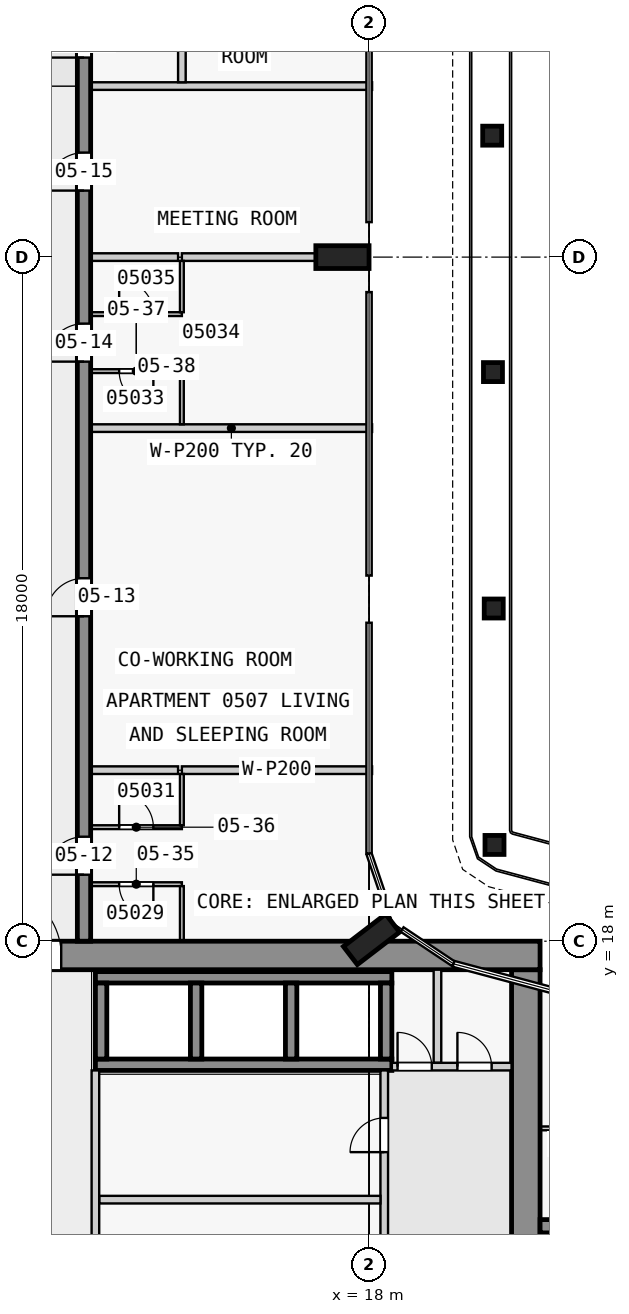
"""IFC4 building model, lengths in metres.
Left out: names, types, materials, properties, quantities, classifications, styles, units other than length and angle.
Written with IfcOpenShell. Run it as: python <this file> out.ifc"""

import sys

from ifc_helpers import new_model, si_unit, direction, frame, frame_2d, origin, origin_2d, place, context, subcontext, project, spatial, rectangle, hollow_rectangle, extrude, element, fill, save


model = new_model("IFC4")
c1 = context("Model", 3, precision=1e-05, world=origin(), true_north=direction((0.0, 1.0)))
c2 = subcontext(c1, "Body", "Model", "MODEL_VIEW")
j1 = project(units=[si_unit("LENGTHUNIT", "METRE"), si_unit("PLANEANGLEUNIT", "RADIAN")], contexts=[c1])
p1 = place(None, origin())
s1 = spatial("IfcSite", under=j1, at=p1, CompositionType="ELEMENT")
p2 = place(p1, origin())
s2 = spatial("IfcBuilding", under=s1, at=p2, CompositionType="ELEMENT")
p3 = place(p2, frame((0.0, 0.0, 26.8)))
s3 = spatial("IfcBuildingStorey", under=s2, at=p3, CompositionType="ELEMENT", Elevation=26.8)
for number, where, z_axis, x_axis in (
    (1, (18.065, 18.05, 0.0), (0.0, 0.0, 1.0), (-0.609, 0.793, 0.0)),
    (2, (17.3, 36.0, 0.0), (0.0, 0.0, 1.0), (0.0, 1.0, 0.0)),
):
    element("IfcColumn", number, at=place(p3, frame(where, z_axis=z_axis, x_axis=x_axis)), inside=s3, PredefinedType="COLUMN", context=c2, shape_type="SweptSolid", body=[
        extrude(rectangle(XDim=0.6, YDim=1.4, at=origin_2d()), origin(), (0.0, 0.0, 1.0), 3.5),
    ])
p4 = place(p3, frame((1.55, 17.625, 0.0), z_axis=(0.0, 0.0, 1.0), x_axis=(1.0, 0.0, 0.0)))
e3 = element("IfcWall", 3, at=p4, inside=s3, PredefinedType="SHEAR", context=c2, shape_type="SweptSolid", body=[
    extrude(rectangle(XDim=20.95, YDim=0.75, at=frame_2d((10.475, 0.0))), origin(), (0.0, 0.0, 1.0), 3.25),
])
p5 = place(p4, frame((6.55, 0.0, 0.0)))
e4 = element("IfcOpeningElement", 4, at=p5, cuts=e3, PredefinedType="OPENING", context=c2, shape_type="SweptSolid", body=[
    extrude(rectangle(XDim=1.8, YDim=2.1, at=frame_2d((0.9, 1.05))), frame((0.0, 0.385, 0.0), z_axis=(0.0, -1.0, 0.0), x_axis=(1.0, 0.0, 0.0)), (0.0, 0.0, 1.0), 0.77),
])
p6 = place(p3, frame((22.125, 2.5, 0.0), z_axis=(0.0, 0.0, 1.0), x_axis=(0.0, 1.0, 0.0)))
e5 = element("IfcWall", 5, at=p6, inside=s3, PredefinedType="SHEAR", context=c2, shape_type="SweptSolid", body=[
    extrude(rectangle(XDim=14.75, YDim=0.75, at=frame_2d((7.375, 0.0))), origin(), (0.0, 0.0, 1.0), 3.25),
])
p7 = place(p6, frame((5.6, 0.0, 0.0)))
e6 = element("IfcOpeningElement", 6, at=p7, cuts=e5, PredefinedType="OPENING", context=c2, shape_type="SweptSolid", body=[
    extrude(rectangle(XDim=1.8, YDim=2.1, at=frame_2d((0.9, 1.05))), frame((0.0, 0.385, 0.0), z_axis=(0.0, -1.0, 0.0), x_axis=(1.0, 0.0, 0.0)), (0.0, 0.0, 1.0), 0.77),
])
for number, where, z_axis, x_axis in (
    (7, (10.8, 17.05, 0.0), (0.0, 0.0, 1.0), (1.0, 0.0, 0.0)),
    (8, (10.8, 14.75, 0.0), (0.0, 0.0, 1.0), (1.0, 0.0, 0.0)),
):
    element("IfcWall", number, at=place(p3, frame(where, z_axis=z_axis, x_axis=x_axis)), inside=s3, PredefinedType="SHEAR", context=c2, shape_type="SweptSolid", body=[
        extrude(rectangle(XDim=7.8, YDim=0.3, at=frame_2d((3.9, 0.0))), origin(), (0.0, 0.0, 1.0), 3.25),
    ])
for number, where, z_axis, x_axis in (
    (9, (10.95, 14.9, 0.0), (0.0, 0.0, 1.0), (0.0, 1.0, 0.0)),
    (10, (13.45, 14.9, 0.0), (0.0, 0.0, 1.0), (0.0, 1.0, 0.0)),
    (11, (15.95, 14.9, 0.0), (0.0, 0.0, 1.0), (0.0, 1.0, 0.0)),
    (12, (18.45, 14.9, 0.0), (0.0, 0.0, 1.0), (0.0, 1.0, 0.0)),
):
    element("IfcWall", number, at=place(p3, frame(where, z_axis=z_axis, x_axis=x_axis)), inside=s3, PredefinedType="SHEAR", context=c2, shape_type="SweptSolid", body=[
        extrude(rectangle(XDim=2.0, YDim=0.3, at=frame_2d((1.0, 0.0))), origin(), (0.0, 0.0, 1.0), 3.25),
    ])
p8 = place(p3, frame((22.5, 10.5, 0.0), z_axis=(0.0, 0.0, 1.0), x_axis=(1.0, 0.0, 0.0)))
e13 = element("IfcWall", 13, at=p8, inside=s3, PredefinedType="SHEAR", context=c2, shape_type="SweptSolid", body=[
    extrude(rectangle(XDim=22.5, YDim=0.35, at=frame_2d((11.25, 0.0))), origin(), (0.0, 0.0, 1.0), 3.25),
])
p9 = place(p8, frame((6.05, 0.0, 0.0)))
e14 = element("IfcOpeningElement", 14, at=p9, cuts=e13, PredefinedType="OPENING", context=c2, shape_type="SweptSolid", body=[
    extrude(rectangle(XDim=1.0, YDim=2.1, at=frame_2d((0.5, 1.05))), frame((0.0, 0.185, 0.0), z_axis=(0.0, -1.0, 0.0), x_axis=(1.0, 0.0, 0.0)), (0.0, 0.0, 1.0), 0.37),
])
p10 = place(p8, frame((15.25, 0.0, 0.0)))
e15 = element("IfcOpeningElement", 15, at=p10, cuts=e13, PredefinedType="OPENING", context=c2, shape_type="SweptSolid", body=[
    extrude(rectangle(XDim=1.0, YDim=2.1, at=frame_2d((0.5, 1.05))), frame((0.0, 0.185, 0.0), z_axis=(0.0, -1.0, 0.0), x_axis=(1.0, 0.0, 0.0)), (0.0, 0.0, 1.0), 0.37),
])
p11 = place(p8, frame((19.75, 0.0, 0.0)))
e16 = element("IfcOpeningElement", 16, at=p11, cuts=e13, PredefinedType="OPENING", context=c2, shape_type="SweptSolid", body=[
    extrude(rectangle(XDim=1.0, YDim=2.1, at=frame_2d((0.5, 1.05))), frame((0.0, 0.185, 0.0), z_axis=(0.0, -1.0, 0.0), x_axis=(1.0, 0.0, 0.0)), (0.0, 0.0, 1.0), 0.37),
])
p12 = place(p3, frame((10.5, 18.0, 0.0), z_axis=(0.0, 0.0, 1.0), x_axis=(0.0, 1.0, 0.0)))
e17 = element("IfcWall", 17, at=p12, inside=s3, PredefinedType="SHEAR", context=c2, shape_type="SweptSolid", body=[
    extrude(rectangle(XDim=27.0, YDim=0.35, at=frame_2d((13.5, 0.0))), origin(), (0.0, 0.0, 1.0), 3.25),
])
p13 = place(p12, frame((1.75, 0.0, 0.0)))
e18 = element("IfcOpeningElement", 18, at=p13, cuts=e17, PredefinedType="OPENING", context=c2, shape_type="SweptSolid", body=[
    extrude(rectangle(XDim=1.0, YDim=2.1, at=frame_2d((0.5, 1.05))), frame((0.0, 0.185, 0.0), z_axis=(0.0, -1.0, 0.0), x_axis=(1.0, 0.0, 0.0)), (0.0, 0.0, 1.0), 0.37),
])
p14 = place(p12, frame((8.55, 0.0, 0.0)))
e19 = element("IfcOpeningElement", 19, at=p14, cuts=e17, PredefinedType="OPENING", context=c2, shape_type="SweptSolid", body=[
    extrude(rectangle(XDim=1.0, YDim=2.1, at=frame_2d((0.5, 1.05))), frame((0.0, 0.185, 0.0), z_axis=(0.0, -1.0, 0.0), x_axis=(1.0, 0.0, 0.0)), (0.0, 0.0, 1.0), 0.37),
])
p15 = place(p12, frame((15.25, 0.0, 0.0)))
e20 = element("IfcOpeningElement", 20, at=p15, cuts=e17, PredefinedType="OPENING", context=c2, shape_type="SweptSolid", body=[
    extrude(rectangle(XDim=1.0, YDim=2.1, at=frame_2d((0.5, 1.05))), frame((0.0, 0.185, 0.0), z_axis=(0.0, -1.0, 0.0), x_axis=(1.0, 0.0, 0.0)), (0.0, 0.0, 1.0), 0.37),
])
p16 = place(p12, frame((19.75, 0.0, 0.0)))
e21 = element("IfcOpeningElement", 21, at=p16, cuts=e17, PredefinedType="OPENING", context=c2, shape_type="SweptSolid", body=[
    extrude(rectangle(XDim=1.0, YDim=2.1, at=frame_2d((0.5, 1.05))), frame((0.0, 0.185, 0.0), z_axis=(0.0, -1.0, 0.0), x_axis=(1.0, 0.0, 0.0)), (0.0, 0.0, 1.0), 0.37),
])
p17 = place(p12, frame((23.25, 0.0, 0.0)))
e22 = element("IfcOpeningElement", 22, at=p17, cuts=e17, PredefinedType="OPENING", context=c2, shape_type="SweptSolid", body=[
    extrude(rectangle(XDim=0.9, YDim=2.1, at=frame_2d((0.45, 1.05))), frame((0.0, 0.185, 0.0), z_axis=(0.0, -1.0, 0.0), x_axis=(1.0, 0.0, 0.0)), (0.0, 0.0, 1.0), 0.37),
])
p18 = place(p12, frame((25.45, 0.0, 0.0)))
e23 = element("IfcOpeningElement", 23, at=p18, cuts=e17, PredefinedType="OPENING", context=c2, shape_type="SweptSolid", body=[
    extrude(rectangle(XDim=1.0, YDim=2.1, at=frame_2d((0.5, 1.05))), frame((0.0, 0.185, 0.0), z_axis=(0.0, -1.0, 0.0), x_axis=(1.0, 0.0, 0.0)), (0.0, 0.0, 1.0), 0.37),
])
p19 = place(p3, frame((10.8, 8.4, 0.0), z_axis=(0.0, 0.0, 1.0), x_axis=(0.0, 1.0, 0.0)))
e24 = element("IfcWall", 24, at=p19, inside=s3, PredefinedType="PARTITIONING", context=c2, shape_type="SweptSolid", body=[
    extrude(rectangle(XDim=6.2, YDim=0.2, at=frame_2d((3.1, 0.0))), origin(), (0.0, 0.0, 1.0), 3.25),
])
p20 = place(p3, frame((18.4, 8.4, 0.0), z_axis=(0.0, 0.0, 1.0), x_axis=(0.0, 1.0, 0.0)))
e25 = element("IfcWall", 25, at=p20, inside=s3, PredefinedType="PARTITIONING", context=c2, shape_type="SweptSolid", body=[
    extrude(rectangle(XDim=6.2, YDim=0.2, at=frame_2d((3.1, 0.0))), origin(), (0.0, 0.0, 1.0), 3.25),
])
p21 = place(p20, frame((0.95, 0.0, 0.0)))
e26 = element("IfcOpeningElement", 26, at=p21, cuts=e25, PredefinedType="OPENING", context=c2, shape_type="SweptSolid", body=[
    extrude(rectangle(XDim=0.9, YDim=2.1, at=frame_2d((0.45, 1.05))), frame((0.0, 0.11, 0.0), z_axis=(0.0, -1.0, 0.0), x_axis=(1.0, 0.0, 0.0)), (0.0, 0.0, 1.0), 0.22),
])
p22 = place(p20, frame((4.05, 0.0, 0.0)))
e27 = element("IfcOpeningElement", 27, at=p22, cuts=e25, PredefinedType="OPENING", context=c2, shape_type="SweptSolid", body=[
    extrude(rectangle(XDim=0.9, YDim=2.1, at=frame_2d((0.45, 1.05))), frame((0.0, 0.11, 0.0), z_axis=(0.0, -1.0, 0.0), x_axis=(1.0, 0.0, 0.0)), (0.0, 0.0, 1.0), 0.22),
])
p23 = place(p3, frame((10.9, 11.2, 0.0), z_axis=(0.0, 0.0, 1.0), x_axis=(1.0, 0.0, 0.0)))
e28 = element("IfcWall", 28, at=p23, inside=s3, PredefinedType="PARTITIONING", context=c2, shape_type="SweptSolid", body=[
    extrude(rectangle(XDim=7.4, YDim=0.2, at=frame_2d((3.7, 0.0))), origin(), (0.0, 0.0, 1.0), 3.25),
])
p24 = place(p3, frame((18.6, 14.7, 0.0), z_axis=(0.0, 0.0, 1.0), x_axis=(1.0, 0.0, 0.0)))
e29 = element("IfcWall", 29, at=p24, inside=s3, PredefinedType="PARTITIONING", context=c2, shape_type="SweptSolid", body=[
    extrude(rectangle(XDim=3.15, YDim=0.2, at=frame_2d((1.575, 0.0))), origin(), (0.0, 0.0, 1.0), 3.25),
])
p25 = place(p24, frame((0.15, 0.0, 0.0)))
e30 = element("IfcOpeningElement", 30, at=p25, cuts=e29, PredefinedType="OPENING", context=c2, shape_type="SweptSolid", body=[
    extrude(rectangle(XDim=0.9, YDim=2.1, at=frame_2d((0.45, 1.05))), frame((0.0, 0.11, 0.0), z_axis=(0.0, -1.0, 0.0), x_axis=(1.0, 0.0, 0.0)), (0.0, 0.0, 1.0), 0.22),
])
p26 = place(p24, frame((1.725, 0.0, 0.0)))
e31 = element("IfcOpeningElement", 31, at=p26, cuts=e29, PredefinedType="OPENING", context=c2, shape_type="SweptSolid", body=[
    extrude(rectangle(XDim=0.9, YDim=2.1, at=frame_2d((0.45, 1.05))), frame((0.0, 0.11, 0.0), z_axis=(0.0, -1.0, 0.0), x_axis=(1.0, 0.0, 0.0)), (0.0, 0.0, 1.0), 0.22),
])
p27 = place(p3, frame((19.8, 14.8, 0.0), z_axis=(0.0, 0.0, 1.0), x_axis=(0.0, 1.0, 0.0)))
e32 = element("IfcWall", 32, at=p27, inside=s3, PredefinedType="PARTITIONING", context=c2, shape_type="SweptSolid", body=[
    extrude(rectangle(XDim=2.45, YDim=0.2, at=frame_2d((1.225, 0.0))), origin(), (0.0, 0.0, 1.0), 3.25),
])
p28 = place(p3, frame((24.25, 13.075, 0.0), z_axis=(0.0, 0.0, 1.0), x_axis=(-1.0, 0.0, 0.0)))
e33 = element("IfcWall", 33, at=p28, inside=s3, PredefinedType="PARTITIONING", context=c2, shape_type="SweptSolid", body=[
    extrude(rectangle(XDim=1.75, YDim=0.1, at=frame_2d((0.875, 0.0))), origin(), (0.0, 0.0, 1.0), 3.25),
])
p29 = place(p3, frame((13.075, 19.5, 0.0), z_axis=(0.0, 0.0, 1.0), x_axis=(-1.0, 0.0, 0.0)))
e34 = element("IfcWall", 34, at=p29, inside=s3, PredefinedType="PARTITIONING", context=c2, shape_type="SweptSolid", body=[
    extrude(rectangle(XDim=2.4, YDim=0.1, at=frame_2d((1.2, 0.0))), origin(), (0.0, 0.0, 1.0), 3.25),
])
p30 = place(p29, frame((0.75, 0.0, 0.0)))
e35 = element("IfcOpeningElement", 35, at=p30, cuts=e34, PredefinedType="OPENING", context=c2, shape_type="SweptSolid", body=[
    extrude(rectangle(XDim=0.9, YDim=2.1, at=frame_2d((0.45, 1.05))), frame((0.0, 0.06, 0.0), z_axis=(0.0, -1.0, 0.0), x_axis=(1.0, 0.0, 0.0)), (0.0, 0.0, 1.0), 0.12),
])
p31 = place(p3, frame((10.675, 21.0, 0.0), z_axis=(0.0, 0.0, 1.0), x_axis=(1.0, 0.0, 0.0)))
e36 = element("IfcWall", 36, at=p31, inside=s3, PredefinedType="PARTITIONING", context=c2, shape_type="SweptSolid", body=[
    extrude(rectangle(XDim=2.4, YDim=0.1, at=frame_2d((1.2, 0.0))), origin(), (0.0, 0.0, 1.0), 3.25),
])
p32 = place(p31, frame((0.75, 0.0, 0.0)))
e37 = element("IfcOpeningElement", 37, at=p32, cuts=e36, PredefinedType="OPENING", context=c2, shape_type="SweptSolid", body=[
    extrude(rectangle(XDim=0.9, YDim=2.1, at=frame_2d((0.45, 1.05))), frame((0.0, 0.06, 0.0), z_axis=(0.0, -1.0, 0.0), x_axis=(1.0, 0.0, 0.0)), (0.0, 0.0, 1.0), 0.12),
])
p33 = place(p3, frame((12.975, 22.5, 0.0), z_axis=(0.0, 0.0, 1.0), x_axis=(-1.0, 0.0, 0.0)))
e38 = element("IfcWall", 38, at=p33, inside=s3, PredefinedType="PARTITIONING", context=c2, shape_type="SweptSolid", body=[
    extrude(rectangle(XDim=2.3, YDim=0.2, at=frame_2d((1.15, 0.0))), origin(), (0.0, 0.0, 1.0), 3.25),
])
p34 = place(p3, frame((13.075, 22.5, 0.0), z_axis=(0.0, 0.0, 1.0), x_axis=(1.0, 0.0, 0.0)))
e39 = element("IfcWall", 39, at=p34, inside=s3, PredefinedType="PARTITIONING", context=c2, shape_type="SweptSolid", body=[
    extrude(rectangle(XDim=5.005, YDim=0.2, at=frame_2d((2.502, 0.0))), origin(), (0.0, 0.0, 1.0), 3.25),
])
p35 = place(p3, frame((18.08, 31.5, 0.0), z_axis=(0.0, 0.0, 1.0), x_axis=(-1.0, 0.0, 0.0)))
e40 = element("IfcWall", 40, at=p35, inside=s3, PredefinedType="PARTITIONING", context=c2, shape_type="SweptSolid", body=[
    extrude(rectangle(XDim=7.405, YDim=0.2, at=frame_2d((3.703, 0.0))), origin(), (0.0, 0.0, 1.0), 3.25),
])
p36 = place(p3, frame((13.075, 33.0, 0.0), z_axis=(0.0, 0.0, 1.0), x_axis=(-1.0, 0.0, 0.0)))
e41 = element("IfcWall", 41, at=p36, inside=s3, PredefinedType="PARTITIONING", context=c2, shape_type="SweptSolid", body=[
    extrude(rectangle(XDim=2.4, YDim=0.1, at=frame_2d((1.2, 0.0))), origin(), (0.0, 0.0, 1.0), 3.25),
])
p37 = place(p36, frame((0.75, 0.0, 0.0)))
e42 = element("IfcOpeningElement", 42, at=p37, cuts=e41, PredefinedType="OPENING", context=c2, shape_type="SweptSolid", body=[
    extrude(rectangle(XDim=0.9, YDim=2.1, at=frame_2d((0.45, 1.05))), frame((0.0, 0.06, 0.0), z_axis=(0.0, -1.0, 0.0), x_axis=(1.0, 0.0, 0.0)), (0.0, 0.0, 1.0), 0.12),
])
p38 = place(p3, frame((10.675, 34.5, 0.0), z_axis=(0.0, 0.0, 1.0), x_axis=(1.0, 0.0, 0.0)))
e43 = element("IfcWall", 43, at=p38, inside=s3, PredefinedType="PARTITIONING", context=c2, shape_type="SweptSolid", body=[
    extrude(rectangle(XDim=2.4, YDim=0.1, at=frame_2d((1.2, 0.0))), origin(), (0.0, 0.0, 1.0), 3.25),
])
p39 = place(p38, frame((0.75, 0.0, 0.0)))
e44 = element("IfcOpeningElement", 44, at=p39, cuts=e43, PredefinedType="OPENING", context=c2, shape_type="SweptSolid", body=[
    extrude(rectangle(XDim=0.9, YDim=2.1, at=frame_2d((0.45, 1.05))), frame((0.0, 0.06, 0.0), z_axis=(0.0, -1.0, 0.0), x_axis=(1.0, 0.0, 0.0)), (0.0, 0.0, 1.0), 0.12),
])
p40 = place(p3, frame((12.975, 36.0, 0.0), z_axis=(0.0, 0.0, 1.0), x_axis=(-1.0, 0.0, 0.0)))
e45 = element("IfcWall", 45, at=p40, inside=s3, PredefinedType="PARTITIONING", context=c2, shape_type="SweptSolid", body=[
    extrude(rectangle(XDim=2.3, YDim=0.2, at=frame_2d((1.15, 0.0))), origin(), (0.0, 0.0, 1.0), 3.25),
])
p41 = place(p3, frame((13.075, 36.0, 0.0), z_axis=(0.0, 0.0, 1.0), x_axis=(1.0, 0.0, 0.0)))
e46 = element("IfcWall", 46, at=p41, inside=s3, PredefinedType="PARTITIONING", context=c2, shape_type="SweptSolid", body=[
    extrude(rectangle(XDim=3.525, YDim=0.2, at=frame_2d((1.763, 0.0))), origin(), (0.0, 0.0, 1.0), 3.25),
])
p42 = place(p3, frame((18.08, 40.5, 0.0), z_axis=(0.0, 0.0, 1.0), x_axis=(-1.0, 0.0, 0.0)))
e47 = element("IfcWall", 47, at=p42, inside=s3, PredefinedType="PARTITIONING", context=c2, shape_type="SweptSolid", body=[
    extrude(rectangle(XDim=7.405, YDim=0.2, at=frame_2d((3.703, 0.0))), origin(), (0.0, 0.0, 1.0), 3.25),
])
p43 = place(p3, frame((13.075, 18.0, 0.0), z_axis=(0.0, 0.0, 1.0), x_axis=(0.0, 1.0, 0.0)))
e48 = element("IfcWall", 48, at=p43, inside=s3, PredefinedType="PARTITIONING", context=c2, shape_type="SweptSolid", body=[
    extrude(rectangle(XDim=1.45, YDim=0.1, at=frame_2d((0.725, 0.0))), origin(), (0.0, 0.0, 1.0), 3.25),
])
for number, where, z_axis, x_axis in (
    (49, (13.075, 21.05, 0.0), (0.0, 0.0, 1.0), (0.0, 1.0, 0.0)),
    (50, (13.075, 31.6, 0.0), (0.0, 0.0, 1.0), (0.0, 1.0, 0.0)),
    (51, (13.075, 34.55, 0.0), (0.0, 0.0, 1.0), (0.0, 1.0, 0.0)),
):
    element("IfcWall", number, at=place(p3, frame(where, z_axis=z_axis, x_axis=x_axis)), inside=s3, PredefinedType="PARTITIONING", context=c2, shape_type="SweptSolid", body=[
        extrude(rectangle(XDim=1.35, YDim=0.1, at=frame_2d((0.675, 0.0))), origin(), (0.0, 0.0, 1.0), 3.25),
    ])
p44 = place(p3, frame((13.075, 40.6, 0.0), z_axis=(0.0, 0.0, 1.0), x_axis=(0.0, 1.0, 0.0)))
e52 = element("IfcWall", 52, at=p44, inside=s3, PredefinedType="PARTITIONING", context=c2, shape_type="SweptSolid", body=[
    extrude(rectangle(XDim=2.2, YDim=0.2, at=frame_2d((1.1, 0.0))), origin(), (0.0, 0.0, 1.0), 3.25),
])
for number, where, z_axis, x_axis in (
    (53, (21.24, 39.195, 0.45), (0.0, 0.0, 1.0), (1.0, 0.0, 0.0)),
    (54, (21.26, 32.975, 0.45), (0.0, 0.0, 1.0), (1.0, 0.0, 0.0)),
    (55, (21.281, 26.754, 0.45), (0.0, 0.0, 1.0), (1.0, 0.0, 0.0)),
    (56, (21.301, 20.533, 0.45), (0.0, 0.0, 1.0), (1.0, 0.0, 0.0)),
):
    element("IfcColumn", number, at=place(p3, frame(where, z_axis=z_axis, x_axis=x_axis)), inside=s3, PredefinedType="COLUMN", context=c2, shape_type="SweptSolid", body=[
        extrude(hollow_rectangle(XDim=0.5, YDim=0.5, WallThickness=0.025, InnerFilletRadius=0.025, OuterFilletRadius=0.05, at=origin_2d()), origin(), (0.0, 0.0, 1.0), 5.85),
    ])
p45 = place(p22, origin())
e57 = element("IfcDoor", 57, at=p45, inside=s3, OperationType="SINGLE_SWING_LEFT", PredefinedType="DOOR", context=c2, shape_type="SweptSolid", body=[
    extrude(rectangle(XDim=0.9, YDim=2.1, at=frame_2d((0.45, 1.05))), frame((0.0, 0.025, 0.0), z_axis=(0.0, -1.0, 0.0), x_axis=(1.0, 0.0, 0.0)), (0.0, 0.0, 1.0), 0.05),
])
fill(e27, e57)
p46 = place(p5, origin())
e58 = element("IfcDoor", 58, at=p46, inside=s3, OperationType="DOUBLE_DOOR_SINGLE_SWING", PredefinedType="DOOR", context=c2, shape_type="SweptSolid", body=[
    extrude(rectangle(XDim=1.8, YDim=2.1, at=frame_2d((0.9, 1.05))), frame((0.0, 0.025, 0.0), z_axis=(0.0, -1.0, 0.0), x_axis=(1.0, 0.0, 0.0)), (0.0, 0.0, 1.0), 0.05),
])
fill(e4, e58)
p47 = place(p25, origin())
e59 = element("IfcDoor", 59, at=p47, inside=s3, OperationType="SINGLE_SWING_LEFT", PredefinedType="DOOR", context=c2, shape_type="SweptSolid", body=[
    extrude(rectangle(XDim=0.9, YDim=2.1, at=frame_2d((0.45, 1.05))), frame((0.0, 0.025, 0.0), z_axis=(0.0, -1.0, 0.0), x_axis=(1.0, 0.0, 0.0)), (0.0, 0.0, 1.0), 0.05),
])
fill(e30, e59)
p48 = place(p26, origin())
e60 = element("IfcDoor", 60, at=p48, inside=s3, OperationType="SINGLE_SWING_LEFT", PredefinedType="DOOR", context=c2, shape_type="SweptSolid", body=[
    extrude(rectangle(XDim=0.9, YDim=2.1, at=frame_2d((0.45, 1.05))), frame((0.0, 0.025, 0.0), z_axis=(0.0, -1.0, 0.0), x_axis=(1.0, 0.0, 0.0)), (0.0, 0.0, 1.0), 0.05),
])
fill(e31, e60)
p49 = place(p13, origin())
e61 = element("IfcDoor", 61, at=p49, inside=s3, OperationType="SINGLE_SWING_LEFT", PredefinedType="DOOR", context=c2, shape_type="SweptSolid", body=[
    extrude(rectangle(XDim=1.0, YDim=2.1, at=frame_2d((0.5, 1.05))), frame((0.0, 0.025, 0.0), z_axis=(0.0, -1.0, 0.0), x_axis=(1.0, 0.0, 0.0)), (0.0, 0.0, 1.0), 0.05),
])
fill(e18, e61)
p50 = place(p14, origin())
e62 = element("IfcDoor", 62, at=p50, inside=s3, OperationType="SINGLE_SWING_LEFT", PredefinedType="DOOR", context=c2, shape_type="SweptSolid", body=[
    extrude(rectangle(XDim=1.0, YDim=2.1, at=frame_2d((0.5, 1.05))), frame((0.0, 0.025, 0.0), z_axis=(0.0, -1.0, 0.0), x_axis=(1.0, 0.0, 0.0)), (0.0, 0.0, 1.0), 0.05),
])
fill(e19, e62)
p51 = place(p15, origin())
e63 = element("IfcDoor", 63, at=p51, inside=s3, OperationType="SINGLE_SWING_RIGHT", PredefinedType="DOOR", context=c2, shape_type="SweptSolid", body=[
    extrude(rectangle(XDim=1.0, YDim=2.1, at=frame_2d((0.5, 1.05))), frame((0.0, 0.025, 0.0), z_axis=(0.0, -1.0, 0.0), x_axis=(1.0, 0.0, 0.0)), (0.0, 0.0, 1.0), 0.05),
])
fill(e20, e63)
p52 = place(p16, origin())
e64 = element("IfcDoor", 64, at=p52, inside=s3, OperationType="SINGLE_SWING_RIGHT", PredefinedType="DOOR", context=c2, shape_type="SweptSolid", body=[
    extrude(rectangle(XDim=1.0, YDim=2.1, at=frame_2d((0.5, 1.05))), frame((0.0, 0.025, 0.0), z_axis=(0.0, -1.0, 0.0), x_axis=(1.0, 0.0, 0.0)), (0.0, 0.0, 1.0), 0.05),
])
fill(e21, e64)
p53 = place(p17, origin())
e65 = element("IfcDoor", 65, at=p53, inside=s3, OperationType="SINGLE_SWING_RIGHT", PredefinedType="DOOR", context=c2, shape_type="SweptSolid", body=[
    extrude(rectangle(XDim=0.9, YDim=2.1, at=frame_2d((0.45, 1.05))), frame((0.0, 0.025, 0.0), z_axis=(0.0, -1.0, 0.0), x_axis=(1.0, 0.0, 0.0)), (0.0, 0.0, 1.0), 0.05),
])
fill(e22, e65)
p54 = place(p30, origin())
e66 = element("IfcDoor", 66, at=p54, inside=s3, OperationType="SINGLE_SWING_RIGHT", PredefinedType="DOOR", context=c2, shape_type="SweptSolid", body=[
    extrude(rectangle(XDim=0.9, YDim=2.1, at=frame_2d((0.45, 1.05))), frame((0.0, 0.025, 0.0), z_axis=(0.0, -1.0, 0.0), x_axis=(1.0, 0.0, 0.0)), (0.0, 0.0, 1.0), 0.05),
])
fill(e35, e66)
p55 = place(p32, origin())
e67 = element("IfcDoor", 67, at=p55, inside=s3, OperationType="SINGLE_SWING_RIGHT", PredefinedType="DOOR", context=c2, shape_type="SweptSolid", body=[
    extrude(rectangle(XDim=0.9, YDim=2.1, at=frame_2d((0.45, 1.05))), frame((0.0, 0.025, 0.0), z_axis=(0.0, -1.0, 0.0), x_axis=(1.0, 0.0, 0.0)), (0.0, 0.0, 1.0), 0.05),
])
fill(e37, e67)
p56 = place(p37, origin())
e68 = element("IfcDoor", 68, at=p56, inside=s3, OperationType="SINGLE_SWING_RIGHT", PredefinedType="DOOR", context=c2, shape_type="SweptSolid", body=[
    extrude(rectangle(XDim=0.9, YDim=2.1, at=frame_2d((0.45, 1.05))), frame((0.0, 0.025, 0.0), z_axis=(0.0, -1.0, 0.0), x_axis=(1.0, 0.0, 0.0)), (0.0, 0.0, 1.0), 0.05),
])
fill(e42, e68)
p57 = place(p39, origin())
e69 = element("IfcDoor", 69, at=p57, inside=s3, OperationType="SINGLE_SWING_RIGHT", PredefinedType="DOOR", context=c2, shape_type="SweptSolid", body=[
    extrude(rectangle(XDim=0.9, YDim=2.1, at=frame_2d((0.45, 1.05))), frame((0.0, 0.025, 0.0), z_axis=(0.0, -1.0, 0.0), x_axis=(1.0, 0.0, 0.0)), (0.0, 0.0, 1.0), 0.05),
])
fill(e44, e69)
save(model, sys.argv[1])
